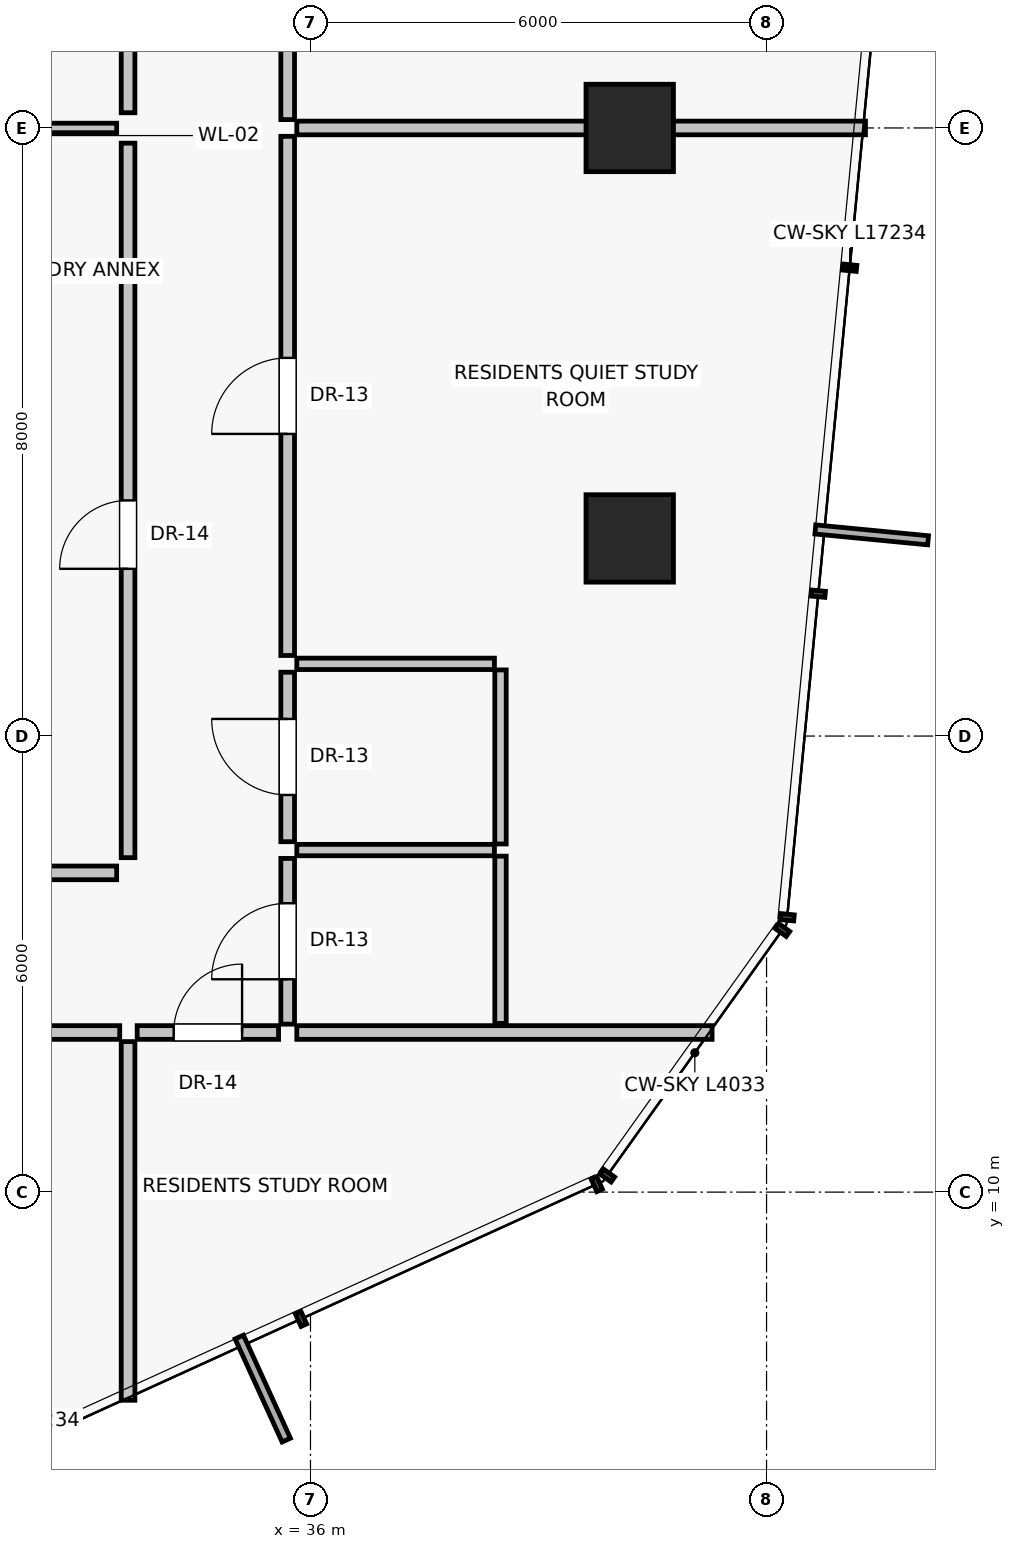
"""IFC4 building model, lengths in metres.
Left out: names, types, materials, properties, quantities, classifications, styles, units other than length and angle.
Written with IfcOpenShell. Run it as: python <this file> out.ifc"""

import sys

from ifc_helpers import new_model, si_unit, direction, frame, frame_2d, origin, origin_2d, place, context, subcontext, project, spatial, rectangle, extrude, source, transform, mapped, element, fill, save


model = new_model("IFC4")
c1 = context("Model", 3, precision=1e-05, world=origin(), true_north=direction((0.0, 1.0)))
c2 = subcontext(c1, "Body", "Model", "MODEL_VIEW")
j1 = project(units=[si_unit("LENGTHUNIT", "METRE"), si_unit("PLANEANGLEUNIT", "RADIAN")], contexts=[c1])
p1 = place(None, origin())
s1 = spatial("IfcSite", under=j1, at=p1, CompositionType="ELEMENT")
p2 = place(p1, origin())
s2 = spatial("IfcBuilding", under=s1, at=p2, CompositionType="ELEMENT")
p3 = place(p2, frame((0.0, 0.0, 108.95)))
s3 = spatial("IfcBuildingStorey", under=s2, at=p3, CompositionType="ELEMENT", Elevation=108.95)
for number, where, z_axis, x_axis in (
    (1, (40.2, 18.6, 0.0), (0.0, 0.0, 1.0), (1.0, 0.0, 0.0)),
    (2, (40.2, 24.0, 0.0), (0.0, 0.0, 1.0), (1.0, 0.0, 0.0)),
):
    element("IfcColumn", number, at=place(p3, frame(where, z_axis=z_axis, x_axis=x_axis)), inside=s3, PredefinedType="COLUMN", context=c2, shape_type="SweptSolid", body=[
        extrude(rectangle(XDim=1.15, YDim=1.15, at=origin_2d()), origin(), (0.0, 0.0, 1.0), 4.3),
    ])
p4 = place(p3, frame((33.6, 14.4, 0.0), z_axis=(0.0, 0.0, 1.0), x_axis=(0.0, 1.0, 0.0)))
e3 = element("IfcWall", 3, at=p4, inside=s3, PredefinedType="PARTITIONING", context=c2, shape_type="SweptSolid", body=[
    extrude(rectangle(XDim=9.4, YDim=0.18, at=frame_2d((4.7, 0.0))), origin(), (0.0, 0.0, 1.0), 4.05),
])
p5 = place(p4, frame((3.8, 0.0, 0.0)))
e4 = element("IfcOpeningElement", 4, at=p5, cuts=e3, PredefinedType="OPENING", context=c2, shape_type="SweptSolid", body=[
    extrude(rectangle(XDim=0.9, YDim=2.01, at=frame_2d((0.45, 1.005))), frame((0.0, 0.1, 0.0), z_axis=(0.0, -1.0, 0.0), x_axis=(1.0, 0.0, 0.0)), (0.0, 0.0, 1.0), 0.2),
])
p6 = place(p3, frame((33.6, 24.2, 0.0), z_axis=(0.0, 0.0, 1.0), x_axis=(0.0, 1.0, 0.0)))
e5 = element("IfcWall", 5, at=p6, inside=s3, PredefinedType="PARTITIONING", context=c2, shape_type="SweptSolid", body=[
    extrude(rectangle(XDim=9.2, YDim=0.18, at=frame_2d((4.6, 0.0))), origin(), (0.0, 0.0, 1.0), 4.05),
])
p7 = place(p6, frame((3.8, 0.0, 0.0)))
e6 = element("IfcOpeningElement", 6, at=p7, cuts=e5, PredefinedType="OPENING", context=c2, shape_type="SweptSolid", body=[
    extrude(rectangle(XDim=0.9, YDim=2.01, at=frame_2d((0.45, 1.005))), frame((0.0, 0.1, 0.0), z_axis=(0.0, -1.0, 0.0), x_axis=(1.0, 0.0, 0.0)), (0.0, 0.0, 1.0), 0.2),
])
p8 = place(p3, frame((31.35, 24.0, 0.0), z_axis=(0.0, 0.0, 1.0), x_axis=(1.0, 0.0, 0.0)))
e7 = element("IfcWall", 7, at=p8, inside=s3, PredefinedType="PARTITIONING", context=c2, shape_type="SweptSolid", body=[
    extrude(rectangle(XDim=2.1, YDim=0.125, at=frame_2d((1.05, 0.0))), origin(), (0.0, 0.0, 1.0), 4.05),
])
p9 = place(p3, frame((30.9, 14.2, 0.0), z_axis=(0.0, 0.0, 1.0), x_axis=(1.0, 0.0, 0.0)))
e8 = element("IfcWall", 8, at=p9, inside=s3, PredefinedType="PARTITIONING", context=c2, shape_type="SweptSolid", body=[
    extrude(rectangle(XDim=2.55, YDim=0.18, at=frame_2d((1.275, 0.0))), origin(), (0.0, 0.0, 1.0), 4.05),
])
p10 = place(p3, frame((33.6, 11.98, 0.0), z_axis=(0.0, 0.0, 1.0), x_axis=(0.0, -1.0, 0.0)))
e9 = element("IfcWall", 9, at=p10, inside=s3, PredefinedType="PARTITIONING", context=c2, shape_type="SweptSolid", body=[
    extrude(rectangle(XDim=4.719, YDim=0.18, at=frame_2d((2.359, 0.0))), origin(), (0.0, 0.0, 1.0), 4.05),
])
p11 = place(p3, frame((25.454, 12.1, 0.0), z_axis=(0.0, 0.0, 1.0), x_axis=(1.0, 0.0, 0.0)))
e10 = element("IfcWall", 10, at=p11, inside=s3, PredefinedType="PARTITIONING", context=c2, shape_type="SweptSolid", body=[
    extrude(rectangle(XDim=8.036, YDim=0.18, at=frame_2d((4.018, 0.0))), origin(), (0.0, 0.0, 1.0), 3.63),
])
p12 = place(p11, frame((3.518, 0.0, 0.0)))
e11 = element("IfcOpeningElement", 11, at=p12, cuts=e10, PredefinedType="OPENING", context=c2, shape_type="SweptSolid", body=[
    extrude(rectangle(XDim=1.0, YDim=2.01, at=frame_2d((0.5, 1.005))), frame((0.0, 0.1, 0.0), z_axis=(0.0, -1.0, 0.0), x_axis=(1.0, 0.0, 0.0)), (0.0, 0.0, 1.0), 0.2),
])
p13 = place(p3, frame((35.82, 12.1, 0.0), z_axis=(0.0, 0.0, 1.0), x_axis=(1.0, 0.0, 0.0)))
e12 = element("IfcWall", 12, at=p13, inside=s3, PredefinedType="PARTITIONING", context=c2, shape_type="SweptSolid", body=[
    extrude(rectangle(XDim=5.463, YDim=0.18, at=frame_2d((2.732, 0.0))), origin(), (0.0, 0.0, 1.0), 4.05),
])
p14 = place(p3, frame((35.7, 12.21, 0.0), z_axis=(0.0, 0.0, 1.0), x_axis=(0.0, 1.0, 0.0)))
e13 = element("IfcWall", 13, at=p14, inside=s3, PredefinedType="PARTITIONING", context=c2, shape_type="SweptSolid", body=[
    extrude(rectangle(XDim=2.18, YDim=0.18, at=frame_2d((1.09, 0.0))), origin(), (0.0, 0.0, 1.0), 4.05),
])
p15 = place(p14, frame((0.59, 0.0, 0.0)))
e14 = element("IfcOpeningElement", 14, at=p15, cuts=e13, PredefinedType="OPENING", context=c2, shape_type="SweptSolid", body=[
    extrude(rectangle(XDim=1.0, YDim=2.01, at=frame_2d((0.5, 1.005))), frame((0.0, 0.1, 0.0), z_axis=(0.0, -1.0, 0.0), x_axis=(1.0, 0.0, 0.0)), (0.0, 0.0, 1.0), 0.2),
])
p16 = place(p3, frame((35.7, 14.61, 0.0), z_axis=(0.0, 0.0, 1.0), x_axis=(0.0, 1.0, 0.0)))
e15 = element("IfcWall", 15, at=p16, inside=s3, PredefinedType="PARTITIONING", context=c2, shape_type="SweptSolid", body=[
    extrude(rectangle(XDim=2.23, YDim=0.18, at=frame_2d((1.115, 0.0))), origin(), (0.0, 0.0, 1.0), 4.05),
])
p17 = place(p16, frame((0.615, 0.0, 0.0)))
e16 = element("IfcOpeningElement", 16, at=p17, cuts=e15, PredefinedType="OPENING", context=c2, shape_type="SweptSolid", body=[
    extrude(rectangle(XDim=1.0, YDim=2.01, at=frame_2d((0.5, 1.005))), frame((0.0, 0.1, 0.0), z_axis=(0.0, -1.0, 0.0), x_axis=(1.0, 0.0, 0.0)), (0.0, 0.0, 1.0), 0.2),
])
p18 = place(p3, frame((35.7, 17.06, 0.0), z_axis=(0.0, 0.0, 1.0), x_axis=(0.0, 1.0, 0.0)))
e17 = element("IfcWall", 17, at=p18, inside=s3, PredefinedType="PARTITIONING", context=c2, shape_type="SweptSolid", body=[
    extrude(rectangle(XDim=6.83, YDim=0.18, at=frame_2d((3.415, 0.0))), origin(), (0.0, 0.0, 1.0), 3.63),
])
p19 = place(p18, frame((2.915, 0.0, 0.0)))
e18 = element("IfcOpeningElement", 18, at=p19, cuts=e17, PredefinedType="OPENING", context=c2, shape_type="SweptSolid", body=[
    extrude(rectangle(XDim=1.0, YDim=2.01, at=frame_2d((0.5, 1.005))), frame((0.0, 0.1, 0.0), z_axis=(0.0, -1.0, 0.0), x_axis=(1.0, 0.0, 0.0)), (0.0, 0.0, 1.0), 0.2),
])
p20 = place(p3, frame((35.7, 24.11, 0.0), z_axis=(0.0, 0.0, 1.0), x_axis=(0.0, 1.0, 0.0)))
e19 = element("IfcWall", 19, at=p20, inside=s3, PredefinedType="PARTITIONING", context=c2, shape_type="SweptSolid", body=[
    extrude(rectangle(XDim=11.48, YDim=0.18, at=frame_2d((5.74, 0.0))), origin(), (0.0, 0.0, 1.0), 3.63),
])
p21 = place(p20, frame((5.24, 0.0, 0.0)))
e20 = element("IfcOpeningElement", 20, at=p21, cuts=e19, PredefinedType="OPENING", context=c2, shape_type="SweptSolid", body=[
    extrude(rectangle(XDim=1.0, YDim=2.01, at=frame_2d((0.5, 1.005))), frame((0.0, 0.1, 0.0), z_axis=(0.0, -1.0, 0.0), x_axis=(1.0, 0.0, 0.0)), (0.0, 0.0, 1.0), 0.2),
])
for number, where, z_axis, x_axis in (
    (21, (35.82, 14.5, 0.0), (0.0, 0.0, 1.0), (1.0, 0.0, 0.0)),
    (22, (35.82, 16.95, 0.0), (0.0, 0.0, 1.0), (1.0, 0.0, 0.0)),
):
    element("IfcWall", number, at=place(p3, frame(where, z_axis=z_axis, x_axis=x_axis)), inside=s3, PredefinedType="PARTITIONING", context=c2, shape_type="SweptSolid", body=[
        extrude(rectangle(XDim=2.6, YDim=0.15, at=frame_2d((1.3, 0.0))), origin(), (0.0, 0.0, 1.0), 4.05),
    ])
p22 = place(p3, frame((38.5, 12.22, 0.0), z_axis=(0.0, 0.0, 1.0), x_axis=(0.0, 1.0, 0.0)))
e23 = element("IfcWall", 23, at=p22, inside=s3, PredefinedType="PARTITIONING", context=c2, shape_type="SweptSolid", body=[
    extrude(rectangle(XDim=2.2, YDim=0.15, at=frame_2d((1.1, 0.0))), origin(), (0.0, 0.0, 1.0), 4.05),
])
p23 = place(p3, frame((38.5, 14.58, 0.0), z_axis=(0.0, 0.0, 1.0), x_axis=(0.0, 1.0, 0.0)))
e24 = element("IfcWall", 24, at=p23, inside=s3, PredefinedType="PARTITIONING", context=c2, shape_type="SweptSolid", body=[
    extrude(rectangle(XDim=2.29, YDim=0.15, at=frame_2d((1.145, 0.0))), origin(), (0.0, 0.0, 1.0), 4.05),
])
p24 = place(p3, frame((35.82, 24.0, 0.0), z_axis=(0.0, 0.0, 1.0), x_axis=(1.0, 0.0, 0.0)))
e25 = element("IfcWall", 25, at=p24, inside=s3, PredefinedType="PARTITIONING", context=c2, shape_type="SweptSolid", body=[
    extrude(rectangle(XDim=7.481, YDim=0.18, at=frame_2d((3.741, 0.0))), origin(), (0.0, 0.0, 1.0), 4.05),
])
p25 = place(p3, frame((33.72, 12.1, 0.0), z_axis=(0.0, 0.0, 1.0), x_axis=(1.0, 0.0, 0.0)))
e26 = element("IfcWall", 26, at=p25, inside=s3, PredefinedType="PARTITIONING", context=c2, shape_type="SweptSolid", body=[
    extrude(rectangle(XDim=1.86, YDim=0.18, at=frame_2d((0.93, 0.0))), origin(), (0.0, 0.0, 1.0), 4.05),
])
p26 = place(p25, frame((0.48, 0.0, 0.0)))
e27 = element("IfcOpeningElement", 27, at=p26, cuts=e26, PredefinedType="OPENING", context=c2, shape_type="SweptSolid", body=[
    extrude(rectangle(XDim=0.9, YDim=2.01, at=frame_2d((0.45, 1.005))), frame((0.0, 0.1, 0.0), z_axis=(0.0, -1.0, 0.0), x_axis=(1.0, 0.0, 0.0)), (0.0, 0.0, 1.0), 0.2),
])
m1 = source(origin(), c2, "Body", "SweptSolid", [
    extrude(rectangle(XDim=0.9, YDim=2.01, at=frame_2d((0.45, 1.005))), frame((0.0, 0.025, 0.0), z_axis=(0.0, -1.0, 0.0), x_axis=(1.0, 0.0, 0.0)), (0.0, 0.0, 1.0), 0.05),
])
p27 = place(p5, origin())
e28 = element("IfcDoor", 28, at=p27, inside=s3, OperationType="SINGLE_SWING_LEFT", PredefinedType="DOOR", context=c2, shape_type="MappedRepresentation", body=[
    mapped(m1, transform((0.0, 0.0, 0.0), scale=1.0)),
])
fill(e4, e28)
m2 = source(origin(), c2, "Body", "SweptSolid", [
    extrude(rectangle(XDim=1.0, YDim=2.01, at=frame_2d((0.5, 1.005))), frame((0.0, 0.025, 0.0), z_axis=(0.0, -1.0, 0.0), x_axis=(1.0, 0.0, 0.0)), (0.0, 0.0, 1.0), 0.05),
])
p28 = place(p15, origin())
e29 = element("IfcDoor", 29, at=p28, inside=s3, OperationType="SINGLE_SWING_LEFT", PredefinedType="DOOR", context=c2, shape_type="MappedRepresentation", body=[
    mapped(m2, transform((0.0, 0.0, 0.0), scale=1.0)),
])
fill(e14, e29)
p29 = place(p17, origin())
e30 = element("IfcDoor", 30, at=p29, inside=s3, OperationType="SINGLE_SWING_RIGHT", PredefinedType="DOOR", context=c2, shape_type="MappedRepresentation", body=[
    mapped(m2, transform((0.0, 0.0, 0.0), scale=1.0)),
])
fill(e16, e30)
p30 = place(p19, origin())
e31 = element("IfcDoor", 31, at=p30, inside=s3, OperationType="SINGLE_SWING_LEFT", PredefinedType="DOOR", context=c2, shape_type="MappedRepresentation", body=[
    mapped(m2, transform((0.0, 0.0, 0.0), scale=1.0)),
])
fill(e18, e31)
p31 = place(p26, origin())
e32 = element("IfcDoor", 32, at=p31, inside=s3, OperationType="SINGLE_SWING_RIGHT", PredefinedType="DOOR", context=c2, shape_type="MappedRepresentation", body=[
    mapped(m1, transform((0.0, 0.0, 0.0), scale=1.0)),
])
fill(e27, e32)
save(model, sys.argv[1])
